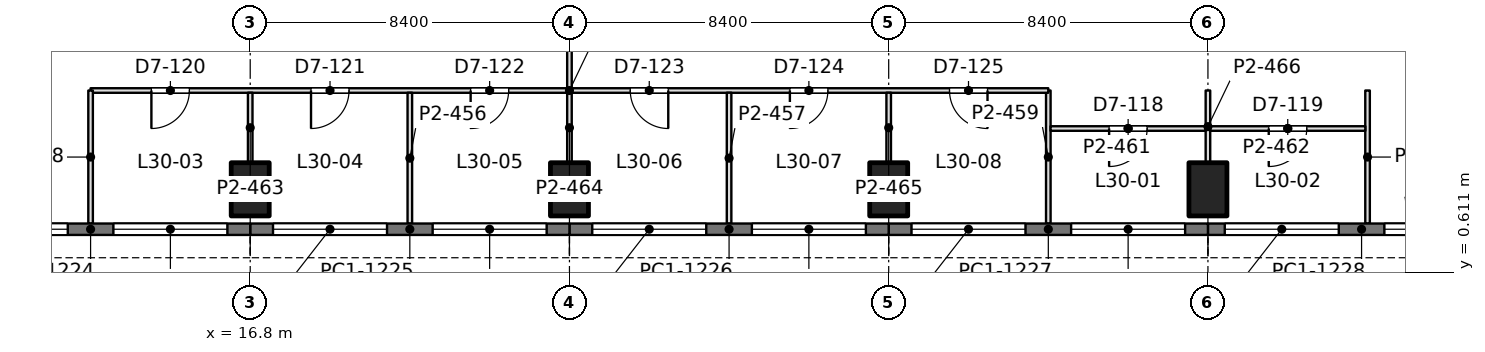
"""IFC4 building model, lengths in metres.
Left out: names, types, materials, properties, quantities, classifications, styles, units other than length and angle.
Written with IfcOpenShell. Run it as: python <this file> out.ifc"""

import sys

from ifc_helpers import new_model, si_unit, direction, frame, frame_2d, origin, origin_2d, place, context, subcontext, project, spatial, rectangle, extrude, element, fill, save


model = new_model("IFC4")
c1 = context("Model", 3, precision=1e-05, world=origin(), true_north=direction((0.0, 1.0)))
c2 = subcontext(c1, "Body", "Model", "MODEL_VIEW")
j1 = project(units=[si_unit("LENGTHUNIT", "METRE"), si_unit("PLANEANGLEUNIT", "RADIAN")], contexts=[c1])
p1 = place(None, origin())
s1 = spatial("IfcSite", under=j1, at=p1, CompositionType="ELEMENT")
p2 = place(p1, origin())
s2 = spatial("IfcBuilding", under=s1, at=p2, CompositionType="ELEMENT")
p3 = place(p2, frame((0.0, 0.0, 134.4)))
s3 = spatial("IfcBuildingStorey", under=s2, at=p3, CompositionType="ELEMENT", Elevation=134.4)
for number, where, z_axis, x_axis in (
    (1, (16.8, 2.8, 0.0), (0.0, 0.0, 1.0), (1.0, 0.0, 0.0)),
    (2, (25.2, 2.8, 0.0), (0.0, 0.0, 1.0), (1.0, 0.0, 0.0)),
    (3, (33.6, 2.8, 0.0), (0.0, 0.0, 1.0), (1.0, 0.0, 0.0)),
    (4, (42.0, 2.8, 0.0), (0.0, 0.0, 1.0), (1.0, 0.0, 0.0)),
):
    element("IfcColumn", number, at=place(p3, frame(where, z_axis=z_axis, x_axis=x_axis)), inside=s3, PredefinedType="COLUMN", context=c2, shape_type="SweptSolid", body=[
        extrude(rectangle(XDim=1.0, YDim=1.4, at=origin_2d()), origin(), (0.0, 0.0, 1.0), 4.2),
    ])
p4 = place(p3, frame((50.085, 1.75, 0.0), z_axis=(0.0, 0.0, 1.0), x_axis=(-1.0, 0.0, 0.0)))
e5 = element("IfcWall", 5, at=p4, inside=s3, PredefinedType="SOLIDWALL", context=c2, shape_type="SweptSolid", body=[
    extrude(rectangle(XDim=8.085, YDim=0.3, at=frame_2d((4.042, 0.0))), origin(), (0.0, 0.0, 1.0), 4.05),
])
p5 = place(p4, frame((0.443, 0.0, 0.9)))
e6 = element("IfcOpeningElement", 6, at=p5, cuts=e5, PredefinedType="OPENING", context=c2, shape_type="SweptSolid", body=[
    extrude(rectangle(XDim=3.0, YDim=1.9, at=frame_2d((1.5, 0.95))), frame((0.0, 0.16, 0.0), z_axis=(0.0, -1.0, 0.0), x_axis=(1.0, 0.0, 0.0)), (0.0, 0.0, 1.0), 0.32),
])
p6 = place(p4, frame((4.643, 0.0, 0.9)))
e7 = element("IfcOpeningElement", 7, at=p6, cuts=e5, PredefinedType="OPENING", context=c2, shape_type="SweptSolid", body=[
    extrude(rectangle(XDim=3.0, YDim=1.9, at=frame_2d((1.5, 0.95))), frame((0.0, 0.16, 0.0), z_axis=(0.0, -1.0, 0.0), x_axis=(1.0, 0.0, 0.0)), (0.0, 0.0, 1.0), 0.32),
])
p7 = place(p3, frame((42.0, 1.75, 0.0), z_axis=(0.0, 0.0, 1.0), x_axis=(-1.0, 0.0, 0.0)))
e8 = element("IfcWall", 8, at=p7, inside=s3, PredefinedType="SOLIDWALL", context=c2, shape_type="SweptSolid", body=[
    extrude(rectangle(XDim=8.4, YDim=0.3, at=frame_2d((4.2, 0.0))), origin(), (0.0, 0.0, 1.0), 4.05),
])
p8 = place(p7, frame((0.6, 0.0, 0.9)))
e9 = element("IfcOpeningElement", 9, at=p8, cuts=e8, PredefinedType="OPENING", context=c2, shape_type="SweptSolid", body=[
    extrude(rectangle(XDim=3.0, YDim=1.9, at=frame_2d((1.5, 0.95))), frame((0.0, 0.16, 0.0), z_axis=(0.0, -1.0, 0.0), x_axis=(1.0, 0.0, 0.0)), (0.0, 0.0, 1.0), 0.32),
])
p9 = place(p7, frame((4.8, 0.0, 0.9)))
e10 = element("IfcOpeningElement", 10, at=p9, cuts=e8, PredefinedType="OPENING", context=c2, shape_type="SweptSolid", body=[
    extrude(rectangle(XDim=3.0, YDim=1.9, at=frame_2d((1.5, 0.95))), frame((0.0, 0.16, 0.0), z_axis=(0.0, -1.0, 0.0), x_axis=(1.0, 0.0, 0.0)), (0.0, 0.0, 1.0), 0.32),
])
p10 = place(p3, frame((33.6, 1.75, 0.0), z_axis=(0.0, 0.0, 1.0), x_axis=(-1.0, 0.0, 0.0)))
e11 = element("IfcWall", 11, at=p10, inside=s3, PredefinedType="SOLIDWALL", context=c2, shape_type="SweptSolid", body=[
    extrude(rectangle(XDim=8.4, YDim=0.3, at=frame_2d((4.2, 0.0))), origin(), (0.0, 0.0, 1.0), 4.05),
])
p11 = place(p10, frame((0.6, 0.0, 0.9)))
e12 = element("IfcOpeningElement", 12, at=p11, cuts=e11, PredefinedType="OPENING", context=c2, shape_type="SweptSolid", body=[
    extrude(rectangle(XDim=3.0, YDim=1.9, at=frame_2d((1.5, 0.95))), frame((0.0, 0.16, 0.0), z_axis=(0.0, -1.0, 0.0), x_axis=(1.0, 0.0, 0.0)), (0.0, 0.0, 1.0), 0.32),
])
p12 = place(p10, frame((4.8, 0.0, 0.9)))
e13 = element("IfcOpeningElement", 13, at=p12, cuts=e11, PredefinedType="OPENING", context=c2, shape_type="SweptSolid", body=[
    extrude(rectangle(XDim=3.0, YDim=1.9, at=frame_2d((1.5, 0.95))), frame((0.0, 0.16, 0.0), z_axis=(0.0, -1.0, 0.0), x_axis=(1.0, 0.0, 0.0)), (0.0, 0.0, 1.0), 0.32),
])
p13 = place(p3, frame((25.2, 1.75, 0.0), z_axis=(0.0, 0.0, 1.0), x_axis=(-1.0, 0.0, 0.0)))
e14 = element("IfcWall", 14, at=p13, inside=s3, PredefinedType="SOLIDWALL", context=c2, shape_type="SweptSolid", body=[
    extrude(rectangle(XDim=8.4, YDim=0.3, at=frame_2d((4.2, 0.0))), origin(), (0.0, 0.0, 1.0), 4.05),
])
p14 = place(p13, frame((0.6, 0.0, 0.9)))
e15 = element("IfcOpeningElement", 15, at=p14, cuts=e14, PredefinedType="OPENING", context=c2, shape_type="SweptSolid", body=[
    extrude(rectangle(XDim=3.0, YDim=1.9, at=frame_2d((1.5, 0.95))), frame((0.0, 0.16, 0.0), z_axis=(0.0, -1.0, 0.0), x_axis=(1.0, 0.0, 0.0)), (0.0, 0.0, 1.0), 0.32),
])
p15 = place(p13, frame((4.8, 0.0, 0.9)))
e16 = element("IfcOpeningElement", 16, at=p15, cuts=e14, PredefinedType="OPENING", context=c2, shape_type="SweptSolid", body=[
    extrude(rectangle(XDim=3.0, YDim=1.9, at=frame_2d((1.5, 0.95))), frame((0.0, 0.16, 0.0), z_axis=(0.0, -1.0, 0.0), x_axis=(1.0, 0.0, 0.0)), (0.0, 0.0, 1.0), 0.32),
])
p16 = place(p3, frame((16.8, 1.75, 0.0), z_axis=(0.0, 0.0, 1.0), x_axis=(-1.0, 0.0, 0.0)))
e17 = element("IfcWall", 17, at=p16, inside=s3, PredefinedType="SOLIDWALL", context=c2, shape_type="SweptSolid", body=[
    extrude(rectangle(XDim=8.4, YDim=0.3, at=frame_2d((4.2, 0.0))), origin(), (0.0, 0.0, 1.0), 4.05),
])
p17 = place(p16, frame((0.6, 0.0, 0.9)))
e18 = element("IfcOpeningElement", 18, at=p17, cuts=e17, PredefinedType="OPENING", context=c2, shape_type="SweptSolid", body=[
    extrude(rectangle(XDim=3.0, YDim=1.9, at=frame_2d((1.5, 0.95))), frame((0.0, 0.16, 0.0), z_axis=(0.0, -1.0, 0.0), x_axis=(1.0, 0.0, 0.0)), (0.0, 0.0, 1.0), 0.32),
])
p18 = place(p16, frame((4.8, 0.0, 0.9)))
e19 = element("IfcOpeningElement", 19, at=p18, cuts=e17, PredefinedType="OPENING", context=c2, shape_type="SweptSolid", body=[
    extrude(rectangle(XDim=3.0, YDim=1.9, at=frame_2d((1.5, 0.95))), frame((0.0, 0.16, 0.0), z_axis=(0.0, -1.0, 0.0), x_axis=(1.0, 0.0, 0.0)), (0.0, 0.0, 1.0), 0.32),
])
p19 = place(p3, frame((37.858, 4.4, 0.0), z_axis=(0.0, 0.0, 1.0), x_axis=(1.0, 0.0, 0.0)))
e20 = element("IfcWall", 20, at=p19, inside=s3, PredefinedType="PARTITIONING", context=c2, shape_type="SweptSolid", body=[
    extrude(rectangle(XDim=4.084, YDim=0.12, at=frame_2d((2.042, 0.0))), origin(), (0.0, 0.0, 1.0), 3.55),
])
p20 = place(p19, frame((1.542, 0.0, 0.0)))
e21 = element("IfcOpeningElement", 21, at=p20, cuts=e20, PredefinedType="OPENING", context=c2, shape_type="SweptSolid", body=[
    extrude(rectangle(XDim=1.0, YDim=2.4, at=frame_2d((0.5, 1.2))), frame((0.0, 0.07, 0.0), z_axis=(0.0, -1.0, 0.0), x_axis=(1.0, 0.0, 0.0)), (0.0, 0.0, 1.0), 0.14),
])
p21 = place(p3, frame((42.058, 4.4, 0.0), z_axis=(0.0, 0.0, 1.0), x_axis=(1.0, 0.0, 0.0)))
e22 = element("IfcWall", 22, at=p21, inside=s3, PredefinedType="PARTITIONING", context=c2, shape_type="SweptSolid", body=[
    extrude(rectangle(XDim=4.084, YDim=0.12, at=frame_2d((2.042, 0.0))), origin(), (0.0, 0.0, 1.0), 3.55),
])
p22 = place(p21, frame((1.542, 0.0, 0.0)))
e23 = element("IfcOpeningElement", 23, at=p22, cuts=e22, PredefinedType="OPENING", context=c2, shape_type="SweptSolid", body=[
    extrude(rectangle(XDim=1.0, YDim=2.4, at=frame_2d((0.5, 1.2))), frame((0.0, 0.07, 0.0), z_axis=(0.0, -1.0, 0.0), x_axis=(1.0, 0.0, 0.0)), (0.0, 0.0, 1.0), 0.14),
])
p23 = place(p3, frame((12.6, 5.4, 0.0), z_axis=(0.0, 0.0, 1.0), x_axis=(1.0, 0.0, 0.0)))
e24 = element("IfcWall", 24, at=p23, inside=s3, PredefinedType="PARTITIONING", context=c2, shape_type="SweptSolid", body=[
    extrude(rectangle(XDim=25.2, YDim=0.12, at=frame_2d((12.6, 0.0))), origin(), (0.0, 0.0, 1.0), 3.55),
])
p24 = place(p23, frame((1.6, 0.0, 0.0)))
e25 = element("IfcOpeningElement", 25, at=p24, cuts=e24, PredefinedType="OPENING", context=c2, shape_type="SweptSolid", body=[
    extrude(rectangle(XDim=1.0, YDim=2.4, at=frame_2d((0.5, 1.2))), frame((0.0, 0.07, 0.0), z_axis=(0.0, -1.0, 0.0), x_axis=(1.0, 0.0, 0.0)), (0.0, 0.0, 1.0), 0.14),
])
p25 = place(p23, frame((5.8, 0.0, 0.0)))
e26 = element("IfcOpeningElement", 26, at=p25, cuts=e24, PredefinedType="OPENING", context=c2, shape_type="SweptSolid", body=[
    extrude(rectangle(XDim=1.0, YDim=2.4, at=frame_2d((0.5, 1.2))), frame((0.0, 0.07, 0.0), z_axis=(0.0, -1.0, 0.0), x_axis=(1.0, 0.0, 0.0)), (0.0, 0.0, 1.0), 0.14),
])
p26 = place(p23, frame((10.0, 0.0, 0.0)))
e27 = element("IfcOpeningElement", 27, at=p26, cuts=e24, PredefinedType="OPENING", context=c2, shape_type="SweptSolid", body=[
    extrude(rectangle(XDim=1.0, YDim=2.4, at=frame_2d((0.5, 1.2))), frame((0.0, 0.07, 0.0), z_axis=(0.0, -1.0, 0.0), x_axis=(1.0, 0.0, 0.0)), (0.0, 0.0, 1.0), 0.14),
])
p27 = place(p23, frame((14.2, 0.0, 0.0)))
e28 = element("IfcOpeningElement", 28, at=p27, cuts=e24, PredefinedType="OPENING", context=c2, shape_type="SweptSolid", body=[
    extrude(rectangle(XDim=1.0, YDim=2.4, at=frame_2d((0.5, 1.2))), frame((0.0, 0.07, 0.0), z_axis=(0.0, -1.0, 0.0), x_axis=(1.0, 0.0, 0.0)), (0.0, 0.0, 1.0), 0.14),
])
p28 = place(p23, frame((18.4, 0.0, 0.0)))
e29 = element("IfcOpeningElement", 29, at=p28, cuts=e24, PredefinedType="OPENING", context=c2, shape_type="SweptSolid", body=[
    extrude(rectangle(XDim=1.0, YDim=2.4, at=frame_2d((0.5, 1.2))), frame((0.0, 0.07, 0.0), z_axis=(0.0, -1.0, 0.0), x_axis=(1.0, 0.0, 0.0)), (0.0, 0.0, 1.0), 0.14),
])
p29 = place(p23, frame((22.6, 0.0, 0.0)))
e30 = element("IfcOpeningElement", 30, at=p29, cuts=e24, PredefinedType="OPENING", context=c2, shape_type="SweptSolid", body=[
    extrude(rectangle(XDim=1.0, YDim=2.4, at=frame_2d((0.5, 1.2))), frame((0.0, 0.07, 0.0), z_axis=(0.0, -1.0, 0.0), x_axis=(1.0, 0.0, 0.0)), (0.0, 0.0, 1.0), 0.14),
])
p30 = place(p3, frame((12.6, 1.898, 0.0), z_axis=(0.0, 0.0, 1.0), x_axis=(0.0, 1.0, 0.0)))
e31 = element("IfcWall", 31, at=p30, inside=s3, PredefinedType="PARTITIONING", context=c2, shape_type="SweptSolid", body=[
    extrude(rectangle(XDim=3.502, YDim=0.12, at=frame_2d((1.751, 0.0))), origin(), (0.0, 0.0, 1.0), 3.56),
])
p31 = place(p3, frame((16.8, 3.499, 0.0), z_axis=(0.0, 0.0, 1.0), x_axis=(0.0, 1.0, 0.0)))
e32 = element("IfcWall", 32, at=p31, inside=s3, PredefinedType="PARTITIONING", context=c2, shape_type="SweptSolid", body=[
    extrude(rectangle(XDim=1.843, YDim=0.12, at=frame_2d((0.921, 0.0))), origin(), (0.0, 0.0, 1.0), 3.55),
])
p32 = place(p3, frame((21.0, 1.898, 0.0), z_axis=(0.0, 0.0, 1.0), x_axis=(0.0, 1.0, 0.0)))
e33 = element("IfcWall", 33, at=p32, inside=s3, PredefinedType="PARTITIONING", context=c2, shape_type="SweptSolid", body=[
    extrude(rectangle(XDim=3.444, YDim=0.12, at=frame_2d((1.722, 0.0))), origin(), (0.0, 0.0, 1.0), 3.56),
])
p33 = place(p3, frame((25.2, 3.499, 0.0), z_axis=(0.0, 0.0, 1.0), x_axis=(0.0, 1.0, 0.0)))
e34 = element("IfcWall", 34, at=p33, inside=s3, PredefinedType="PARTITIONING", context=c2, shape_type="SweptSolid", body=[
    extrude(rectangle(XDim=1.843, YDim=0.12, at=frame_2d((0.921, 0.0))), origin(), (0.0, 0.0, 1.0), 3.55),
])
p34 = place(p3, frame((29.4, 1.898, 0.0), z_axis=(0.0, 0.0, 1.0), x_axis=(0.0, 1.0, 0.0)))
e35 = element("IfcWall", 35, at=p34, inside=s3, PredefinedType="PARTITIONING", context=c2, shape_type="SweptSolid", body=[
    extrude(rectangle(XDim=3.444, YDim=0.12, at=frame_2d((1.722, 0.0))), origin(), (0.0, 0.0, 1.0), 3.56),
])
p35 = place(p3, frame((33.6, 3.499, 0.0), z_axis=(0.0, 0.0, 1.0), x_axis=(0.0, 1.0, 0.0)))
e36 = element("IfcWall", 36, at=p35, inside=s3, PredefinedType="PARTITIONING", context=c2, shape_type="SweptSolid", body=[
    extrude(rectangle(XDim=1.843, YDim=0.12, at=frame_2d((0.921, 0.0))), origin(), (0.0, 0.0, 1.0), 3.55),
])
p36 = place(p3, frame((37.8, 1.898, 0.0), z_axis=(0.0, 0.0, 1.0), x_axis=(0.0, 1.0, 0.0)))
e37 = element("IfcWall", 37, at=p36, inside=s3, PredefinedType="PARTITIONING", context=c2, shape_type="SweptSolid", body=[
    extrude(rectangle(XDim=3.502, YDim=0.12, at=frame_2d((1.751, 0.0))), origin(), (0.0, 0.0, 1.0), 3.56),
])
p37 = place(p3, frame((42.0, 3.499, 0.0), z_axis=(0.0, 0.0, 1.0), x_axis=(0.0, 1.0, 0.0)))
e38 = element("IfcWall", 38, at=p37, inside=s3, PredefinedType="PARTITIONING", context=c2, shape_type="SweptSolid", body=[
    extrude(rectangle(XDim=1.901, YDim=0.12, at=frame_2d((0.95, 0.0))), origin(), (0.0, 0.0, 1.0), 3.55),
])
p38 = place(p3, frame((46.2, 1.898, 0.0), z_axis=(0.0, 0.0, 1.0), x_axis=(0.0, 1.0, 0.0)))
e39 = element("IfcWall", 39, at=p38, inside=s3, PredefinedType="PARTITIONING", context=c2, shape_type="SweptSolid", body=[
    extrude(rectangle(XDim=3.502, YDim=0.12, at=frame_2d((1.751, 0.0))), origin(), (0.0, 0.0, 1.0), 3.56),
])
p39 = place(p3, frame((25.2, 5.458, 0.0), z_axis=(0.0, 0.0, 1.0), x_axis=(0.0, 1.0, 0.0)))
e40 = element("IfcWall", 40, at=p39, inside=s3, PredefinedType="PARTITIONING", context=c2, shape_type="SweptSolid", body=[
    extrude(rectangle(XDim=2.243, YDim=0.12, at=frame_2d((1.122, 0.0))), origin(), (0.0, 0.0, 1.0), 3.55),
])
p40 = place(p5, origin())
e41 = element("IfcWindow", 41, at=p40, inside=s3, PartitioningType="SINGLE_PANEL", PredefinedType="WINDOW", context=c2, shape_type="SweptSolid", body=[
    extrude(rectangle(XDim=3.0, YDim=1.9, at=frame_2d((1.5, 0.95))), frame((0.0, 0.03, 0.0), z_axis=(0.0, -1.0, 0.0), x_axis=(1.0, 0.0, 0.0)), (0.0, 0.0, 1.0), 0.06),
])
fill(e6, e41)
p41 = place(p6, origin())
e42 = element("IfcWindow", 42, at=p41, inside=s3, PartitioningType="SINGLE_PANEL", PredefinedType="WINDOW", context=c2, shape_type="SweptSolid", body=[
    extrude(rectangle(XDim=3.0, YDim=1.9, at=frame_2d((1.5, 0.95))), frame((0.0, 0.03, 0.0), z_axis=(0.0, -1.0, 0.0), x_axis=(1.0, 0.0, 0.0)), (0.0, 0.0, 1.0), 0.06),
])
fill(e7, e42)
p42 = place(p8, origin())
e43 = element("IfcWindow", 43, at=p42, inside=s3, PartitioningType="SINGLE_PANEL", PredefinedType="WINDOW", context=c2, shape_type="SweptSolid", body=[
    extrude(rectangle(XDim=3.0, YDim=1.9, at=frame_2d((1.5, 0.95))), frame((0.0, 0.03, 0.0), z_axis=(0.0, -1.0, 0.0), x_axis=(1.0, 0.0, 0.0)), (0.0, 0.0, 1.0), 0.06),
])
fill(e9, e43)
p43 = place(p9, origin())
e44 = element("IfcWindow", 44, at=p43, inside=s3, PartitioningType="SINGLE_PANEL", PredefinedType="WINDOW", context=c2, shape_type="SweptSolid", body=[
    extrude(rectangle(XDim=3.0, YDim=1.9, at=frame_2d((1.5, 0.95))), frame((0.0, 0.03, 0.0), z_axis=(0.0, -1.0, 0.0), x_axis=(1.0, 0.0, 0.0)), (0.0, 0.0, 1.0), 0.06),
])
fill(e10, e44)
p44 = place(p11, origin())
e45 = element("IfcWindow", 45, at=p44, inside=s3, PartitioningType="SINGLE_PANEL", PredefinedType="WINDOW", context=c2, shape_type="SweptSolid", body=[
    extrude(rectangle(XDim=3.0, YDim=1.9, at=frame_2d((1.5, 0.95))), frame((0.0, 0.03, 0.0), z_axis=(0.0, -1.0, 0.0), x_axis=(1.0, 0.0, 0.0)), (0.0, 0.0, 1.0), 0.06),
])
fill(e12, e45)
p45 = place(p12, origin())
e46 = element("IfcWindow", 46, at=p45, inside=s3, PartitioningType="SINGLE_PANEL", PredefinedType="WINDOW", context=c2, shape_type="SweptSolid", body=[
    extrude(rectangle(XDim=3.0, YDim=1.9, at=frame_2d((1.5, 0.95))), frame((0.0, 0.03, 0.0), z_axis=(0.0, -1.0, 0.0), x_axis=(1.0, 0.0, 0.0)), (0.0, 0.0, 1.0), 0.06),
])
fill(e13, e46)
p46 = place(p14, origin())
e47 = element("IfcWindow", 47, at=p46, inside=s3, PartitioningType="SINGLE_PANEL", PredefinedType="WINDOW", context=c2, shape_type="SweptSolid", body=[
    extrude(rectangle(XDim=3.0, YDim=1.9, at=frame_2d((1.5, 0.95))), frame((0.0, 0.03, 0.0), z_axis=(0.0, -1.0, 0.0), x_axis=(1.0, 0.0, 0.0)), (0.0, 0.0, 1.0), 0.06),
])
fill(e15, e47)
p47 = place(p15, origin())
e48 = element("IfcWindow", 48, at=p47, inside=s3, PartitioningType="SINGLE_PANEL", PredefinedType="WINDOW", context=c2, shape_type="SweptSolid", body=[
    extrude(rectangle(XDim=3.0, YDim=1.9, at=frame_2d((1.5, 0.95))), frame((0.0, 0.03, 0.0), z_axis=(0.0, -1.0, 0.0), x_axis=(1.0, 0.0, 0.0)), (0.0, 0.0, 1.0), 0.06),
])
fill(e16, e48)
p48 = place(p17, origin())
e49 = element("IfcWindow", 49, at=p48, inside=s3, PartitioningType="SINGLE_PANEL", PredefinedType="WINDOW", context=c2, shape_type="SweptSolid", body=[
    extrude(rectangle(XDim=3.0, YDim=1.9, at=frame_2d((1.5, 0.95))), frame((0.0, 0.03, 0.0), z_axis=(0.0, -1.0, 0.0), x_axis=(1.0, 0.0, 0.0)), (0.0, 0.0, 1.0), 0.06),
])
fill(e18, e49)
p49 = place(p18, origin())
e50 = element("IfcWindow", 50, at=p49, inside=s3, PartitioningType="SINGLE_PANEL", PredefinedType="WINDOW", context=c2, shape_type="SweptSolid", body=[
    extrude(rectangle(XDim=3.0, YDim=1.9, at=frame_2d((1.5, 0.95))), frame((0.0, 0.03, 0.0), z_axis=(0.0, -1.0, 0.0), x_axis=(1.0, 0.0, 0.0)), (0.0, 0.0, 1.0), 0.06),
])
fill(e19, e50)
p50 = place(p20, frame((1.0, 0.0, 0.0), z_axis=(0.0, 0.0, 1.0), x_axis=(-1.0, 0.0, 0.0)))
e51 = element("IfcDoor", 51, at=p50, inside=s3, OperationType="SINGLE_SWING_RIGHT", PredefinedType="DOOR", context=c2, shape_type="SweptSolid", body=[
    extrude(rectangle(XDim=1.0, YDim=2.4, at=frame_2d((0.5, 1.2))), frame((0.0, 0.025, 0.0), z_axis=(0.0, -1.0, 0.0), x_axis=(1.0, 0.0, 0.0)), (0.0, 0.0, 1.0), 0.05),
])
fill(e21, e51)
p51 = place(p22, frame((1.0, 0.0, 0.0), z_axis=(0.0, 0.0, 1.0), x_axis=(-1.0, 0.0, 0.0)))
e52 = element("IfcDoor", 52, at=p51, inside=s3, OperationType="SINGLE_SWING_RIGHT", PredefinedType="DOOR", context=c2, shape_type="SweptSolid", body=[
    extrude(rectangle(XDim=1.0, YDim=2.4, at=frame_2d((0.5, 1.2))), frame((0.0, 0.025, 0.0), z_axis=(0.0, -1.0, 0.0), x_axis=(1.0, 0.0, 0.0)), (0.0, 0.0, 1.0), 0.05),
])
fill(e23, e52)
p52 = place(p24, frame((1.0, 0.0, 0.0), z_axis=(0.0, 0.0, 1.0), x_axis=(-1.0, 0.0, 0.0)))
e53 = element("IfcDoor", 53, at=p52, inside=s3, OperationType="SINGLE_SWING_RIGHT", PredefinedType="DOOR", context=c2, shape_type="SweptSolid", body=[
    extrude(rectangle(XDim=1.0, YDim=2.4, at=frame_2d((0.5, 1.2))), frame((0.0, 0.025, 0.0), z_axis=(0.0, -1.0, 0.0), x_axis=(1.0, 0.0, 0.0)), (0.0, 0.0, 1.0), 0.05),
])
fill(e25, e53)
p53 = place(p25, frame((1.0, 0.0, 0.0), z_axis=(0.0, 0.0, 1.0), x_axis=(-1.0, 0.0, 0.0)))
e54 = element("IfcDoor", 54, at=p53, inside=s3, OperationType="SINGLE_SWING_RIGHT", PredefinedType="DOOR", context=c2, shape_type="SweptSolid", body=[
    extrude(rectangle(XDim=1.0, YDim=2.4, at=frame_2d((0.5, 1.2))), frame((0.0, 0.025, 0.0), z_axis=(0.0, -1.0, 0.0), x_axis=(1.0, 0.0, 0.0)), (0.0, 0.0, 1.0), 0.05),
])
fill(e26, e54)
p54 = place(p26, frame((1.0, 0.0, 0.0), z_axis=(0.0, 0.0, 1.0), x_axis=(-1.0, 0.0, 0.0)))
e55 = element("IfcDoor", 55, at=p54, inside=s3, OperationType="SINGLE_SWING_RIGHT", PredefinedType="DOOR", context=c2, shape_type="SweptSolid", body=[
    extrude(rectangle(XDim=1.0, YDim=2.4, at=frame_2d((0.5, 1.2))), frame((0.0, 0.025, 0.0), z_axis=(0.0, -1.0, 0.0), x_axis=(1.0, 0.0, 0.0)), (0.0, 0.0, 1.0), 0.05),
])
fill(e27, e55)
p55 = place(p27, frame((1.0, 0.0, 0.0), z_axis=(0.0, 0.0, 1.0), x_axis=(-1.0, 0.0, 0.0)))
e56 = element("IfcDoor", 56, at=p55, inside=s3, OperationType="SINGLE_SWING_LEFT", PredefinedType="DOOR", context=c2, shape_type="SweptSolid", body=[
    extrude(rectangle(XDim=1.0, YDim=2.4, at=frame_2d((0.5, 1.2))), frame((0.0, 0.025, 0.0), z_axis=(0.0, -1.0, 0.0), x_axis=(1.0, 0.0, 0.0)), (0.0, 0.0, 1.0), 0.05),
])
fill(e28, e56)
p56 = place(p28, frame((1.0, 0.0, 0.0), z_axis=(0.0, 0.0, 1.0), x_axis=(-1.0, 0.0, 0.0)))
e57 = element("IfcDoor", 57, at=p56, inside=s3, OperationType="SINGLE_SWING_RIGHT", PredefinedType="DOOR", context=c2, shape_type="SweptSolid", body=[
    extrude(rectangle(XDim=1.0, YDim=2.4, at=frame_2d((0.5, 1.2))), frame((0.0, 0.025, 0.0), z_axis=(0.0, -1.0, 0.0), x_axis=(1.0, 0.0, 0.0)), (0.0, 0.0, 1.0), 0.05),
])
fill(e29, e57)
p57 = place(p29, frame((1.0, 0.0, 0.0), z_axis=(0.0, 0.0, 1.0), x_axis=(-1.0, 0.0, 0.0)))
e58 = element("IfcDoor", 58, at=p57, inside=s3, OperationType="SINGLE_SWING_LEFT", PredefinedType="DOOR", context=c2, shape_type="SweptSolid", body=[
    extrude(rectangle(XDim=1.0, YDim=2.4, at=frame_2d((0.5, 1.2))), frame((0.0, 0.025, 0.0), z_axis=(0.0, -1.0, 0.0), x_axis=(1.0, 0.0, 0.0)), (0.0, 0.0, 1.0), 0.05),
])
fill(e30, e58)
save(model, sys.argv[1])
